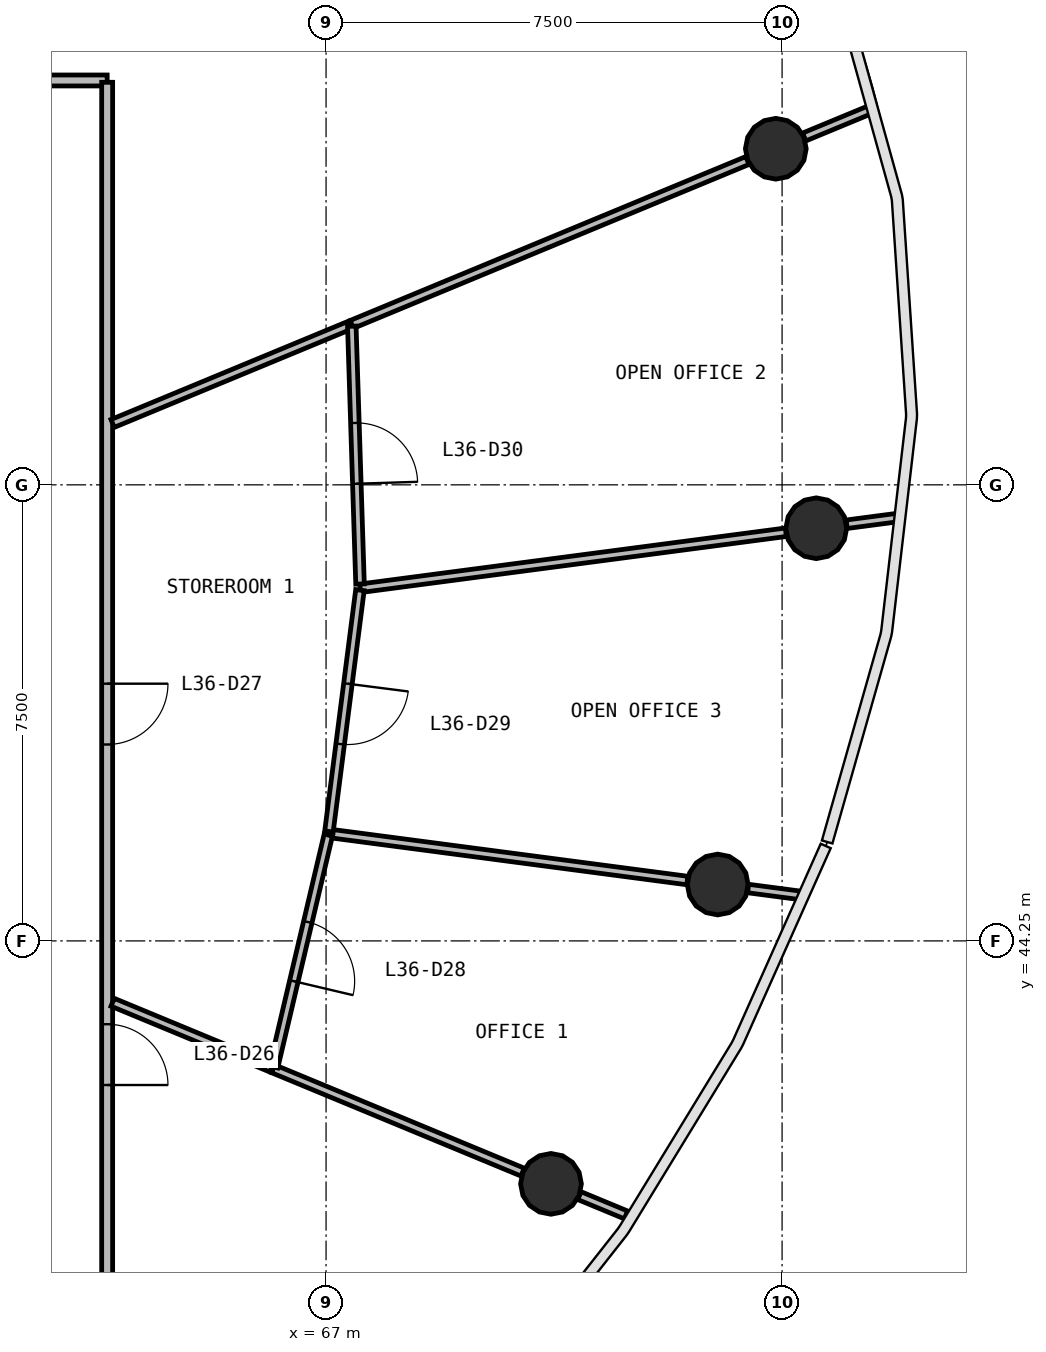
"""IFC4 building model, lengths in metres.
Left out: names, types, materials, properties, quantities, classifications, styles, units other than length and angle.
Written with IfcOpenShell. Run it as: python <this file> out.ifc"""

import sys

from ifc_helpers import new_model, si_unit, direction, frame, frame_2d, origin, origin_2d, place, context, subcontext, project, spatial, rectangle, circle, extrude, source, transform, mapped, element, fill, save


model = new_model("IFC4")
c1 = context("Model", 3, precision=1e-05, world=origin(), true_north=direction((0.0, 1.0)))
c2 = subcontext(c1, "Body", "Model", "MODEL_VIEW")
j1 = project(units=[si_unit("LENGTHUNIT", "METRE"), si_unit("PLANEANGLEUNIT", "RADIAN")], contexts=[c1])
p1 = place(None, origin())
s1 = spatial("IfcSite", under=j1, at=p1, CompositionType="ELEMENT")
p2 = place(p1, origin())
s2 = spatial("IfcBuilding", under=s1, at=p2, CompositionType="ELEMENT")
p3 = place(p2, frame((0.0, 0.0, 152.6)))
s3 = spatial("IfcBuildingStorey", under=s2, at=p3, CompositionType="ELEMENT", Elevation=152.6)
m1 = source(origin(), c2, "Body", "SweptSolid", [
    extrude(circle(Radius=0.5, at=origin_2d()), origin(), (0.0, 0.0, 1.0), 3.9),
])
for number, where, z_axis, x_axis in (
    (1, (75.062, 51.036, 0.0), (0.0, 0.0, 1.0), (1.0, 0.0, 0.0)),
    (2, (74.397, 57.277, 0.0), (0.0, 0.0, 1.0), (1.0, 0.0, 0.0)),
    (3, (70.699, 40.254, 0.0), (0.0, 0.0, 1.0), (1.0, 0.0, 0.0)),
    (4, (73.441, 45.177, 0.0), (0.0, 0.0, 1.0), (1.0, 0.0, 0.0)),
):
    element("IfcColumn", number, at=place(p3, frame(where, z_axis=z_axis, x_axis=x_axis)), inside=s3, PredefinedType="COLUMN", context=c2, shape_type="MappedRepresentation", body=[
        mapped(m1, transform((0.0, 0.0, 0.0), scale=1.0)),
    ])
p4 = place(p3, frame((40.6, 58.4, 0.0), z_axis=(0.0, 0.0, 1.0), x_axis=(1.0, 0.0, 0.0)))
e5 = element("IfcWall", 5, at=p4, inside=s3, PredefinedType="PARTITIONING", context=c2, shape_type="SweptSolid", body=[
    extrude(rectangle(XDim=22.8, YDim=0.18, at=frame_2d((11.4, 0.0))), origin(), (0.0, 0.0, 1.0), 2.88),
])
p5 = place(p4, frame((12.95, 0.0, 0.0)))
e6 = element("IfcOpeningElement", 6, at=p5, cuts=e5, PredefinedType="OPENING", context=c2, shape_type="SweptSolid", body=[
    extrude(rectangle(XDim=1.0, YDim=2.1, at=frame_2d((0.5, 1.05))), frame((0.0, 0.1, 0.0), z_axis=(0.0, -1.0, 0.0), x_axis=(1.0, 0.0, 0.0)), (0.0, 0.0, 1.0), 0.2),
])
p6 = place(p4, frame((10.95, 0.0, 0.0)))
e7 = element("IfcOpeningElement", 7, at=p6, cuts=e5, PredefinedType="OPENING", context=c2, shape_type="SweptSolid", body=[
    extrude(rectangle(XDim=1.0, YDim=2.1, at=frame_2d((0.5, 1.05))), frame((0.0, 0.1, 0.0), z_axis=(0.0, -1.0, 0.0), x_axis=(1.0, 0.0, 0.0)), (0.0, 0.0, 1.0), 0.2),
])
p7 = place(p3, frame((63.4, 58.37, 0.0), z_axis=(0.0, 0.0, 1.0), x_axis=(0.0, -1.0, 0.0)))
e8 = element("IfcWall", 8, at=p7, inside=s3, PredefinedType="PARTITIONING", context=c2, shape_type="SweptSolid", body=[
    extrude(rectangle(XDim=20.74, YDim=0.18, at=frame_2d((10.37, 0.0))), origin(), (0.0, 0.0, 1.0), 2.88),
])
p8 = place(p7, frame((15.49, 0.0, 0.0)))
e9 = element("IfcOpeningElement", 9, at=p8, cuts=e8, PredefinedType="OPENING", context=c2, shape_type="SweptSolid", body=[
    extrude(rectangle(XDim=1.0, YDim=2.1, at=frame_2d((0.5, 1.05))), frame((0.0, 0.1, 0.0), z_axis=(0.0, -1.0, 0.0), x_axis=(1.0, 0.0, 0.0)), (0.0, 0.0, 1.0), 0.2),
])
p9 = place(p7, frame((9.89, 0.0, 0.0)))
e10 = element("IfcOpeningElement", 10, at=p9, cuts=e8, PredefinedType="OPENING", context=c2, shape_type="SweptSolid", body=[
    extrude(rectangle(XDim=1.0, YDim=2.1, at=frame_2d((0.5, 1.05))), frame((0.0, 0.1, 0.0), z_axis=(0.0, -1.0, 0.0), x_axis=(1.0, 0.0, 0.0)), (0.0, 0.0, 1.0), 0.2),
])
p10 = place(p3, frame((67.561, 50.049, 0.0), z_axis=(0.0, 0.0, 1.0), x_axis=(0.991446056041, 0.130517117504, 0.0)))
e11 = element("IfcWall", 11, at=p10, inside=s3, PredefinedType="PARTITIONING", context=c2, shape_type="SweptSolid", body=[
    extrude(rectangle(XDim=7.061, YDim=0.14, at=frame_2d((3.531, 0.0))), origin(), (0.0, 0.0, 1.0), 2.88),
])
p11 = place(p3, frame((67.423, 54.388, 0.0), z_axis=(0.0, 0.0, 1.0), x_axis=(0.923877847589, 0.382687500102, 0.0)))
e12 = element("IfcWall", 12, at=p11, inside=s3, PredefinedType="PARTITIONING", context=c2, shape_type="SweptSolid", body=[
    extrude(rectangle(XDim=7.044, YDim=0.14, at=frame_2d((3.522, 0.0))), origin(), (0.0, 0.0, 1.0), 2.88),
])
p12 = place(p3, frame((67.044, 46.019, 0.0), z_axis=(0.0, 0.0, 1.0), x_axis=(0.991450523091, -0.13048318, 0.0)))
e13 = element("IfcWall", 13, at=p12, inside=s3, PredefinedType="PARTITIONING", context=c2, shape_type="SweptSolid", body=[
    extrude(rectangle(XDim=5.948, YDim=0.14, at=frame_2d((2.974, 0.0))), origin(), (0.0, 0.0, 1.0), 2.88),
])
p13 = place(p3, frame((66.131, 42.147, 0.0), z_axis=(0.0, 0.0, 1.0), x_axis=(0.923872072557, -0.382701441792, 0.0)))
e14 = element("IfcWall", 14, at=p13, inside=s3, PredefinedType="PARTITIONING", context=c2, shape_type="SweptSolid", body=[
    extrude(rectangle(XDim=4.44, YDim=0.14, at=frame_2d((2.22, 0.0))), origin(), (0.0, 0.0, 1.0), 2.88),
])
p14 = place(p3, frame((63.49, 52.759, 0.0), z_axis=(0.0, 0.0, 1.0), x_axis=(0.923878137975, 0.382686799055, 0.0)))
e15 = element("IfcWall", 15, at=p14, inside=s3, PredefinedType="PARTITIONING", context=c2, shape_type="SweptSolid", body=[
    extrude(rectangle(XDim=4.227, YDim=0.14, at=frame_2d((2.113, 0.0))), origin(), (0.0, 0.0, 1.0), 2.88),
])
p15 = place(p3, frame((67.424, 54.358, 0.0), z_axis=(0.0, 0.0, 1.0), x_axis=(0.031887030208, -0.999491479356, 0.0)))
e16 = element("IfcWall", 16, at=p15, inside=s3, PredefinedType="PARTITIONING", context=c2, shape_type="SweptSolid", body=[
    extrude(rectangle(XDim=4.242, YDim=0.14, at=frame_2d((2.121, 0.0))), origin(), (0.0, 0.0, 1.0), 2.88),
])
p16 = place(p15, frame((1.592, 0.0, 0.0)))
e17 = element("IfcOpeningElement", 17, at=p16, cuts=e16, PredefinedType="OPENING", context=c2, shape_type="SweptSolid", body=[
    extrude(rectangle(XDim=1.0, YDim=2.1, at=frame_2d((0.5, 1.05))), frame((0.0, 0.08, 0.0), z_axis=(0.0, -1.0, 0.0), x_axis=(1.0, 0.0, 0.0)), (0.0, 0.0, 1.0), 0.16),
])
p17 = place(p3, frame((67.557, 50.019, 0.0), z_axis=(0.0, 0.0, 1.0), x_axis=(-0.127375141881, -0.99185461295, 0.0)))
e18 = element("IfcWall", 18, at=p17, inside=s3, PredefinedType="PARTITIONING", context=c2, shape_type="SweptSolid", body=[
    extrude(rectangle(XDim=4.002, YDim=0.14, at=frame_2d((2.001, 0.0))), origin(), (0.0, 0.0, 1.0), 2.88),
])
p18 = place(p17, frame((1.552, 0.0, 0.0)))
e19 = element("IfcOpeningElement", 19, at=p18, cuts=e18, PredefinedType="OPENING", context=c2, shape_type="SweptSolid", body=[
    extrude(rectangle(XDim=1.0, YDim=2.1, at=frame_2d((0.5, 1.05))), frame((0.0, 0.08, 0.0), z_axis=(0.0, -1.0, 0.0), x_axis=(1.0, 0.0, 0.0)), (0.0, 0.0, 1.0), 0.16),
])
p19 = place(p3, frame((67.037, 45.99, 0.0), z_axis=(0.0, 0.0, 1.0), x_axis=(-0.229452538662, -0.973319851077, 0.0)))
e20 = element("IfcWall", 20, at=p19, inside=s3, PredefinedType="PARTITIONING", context=c2, shape_type="SweptSolid", body=[
    extrude(rectangle(XDim=3.919, YDim=0.14, at=frame_2d((1.959, 0.0))), origin(), (0.0, 0.0, 1.0), 2.88),
])
p20 = place(p19, frame((1.469, 0.0, 0.0)))
e21 = element("IfcOpeningElement", 21, at=p20, cuts=e20, PredefinedType="OPENING", context=c2, shape_type="SweptSolid", body=[
    extrude(rectangle(XDim=1.0, YDim=2.1, at=frame_2d((0.5, 1.05))), frame((0.0, 0.08, 0.0), z_axis=(0.0, -1.0, 0.0), x_axis=(1.0, 0.0, 0.0)), (0.0, 0.0, 1.0), 0.16),
])
p21 = place(p3, frame((63.49, 43.241, 0.0), z_axis=(0.0, 0.0, 1.0), x_axis=(0.923859015747, -0.382732960462, 0.0)))
e22 = element("IfcWall", 22, at=p21, inside=s3, PredefinedType="PARTITIONING", context=c2, shape_type="SweptSolid", body=[
    extrude(rectangle(XDim=2.828, YDim=0.14, at=frame_2d((1.414, 0.0))), origin(), (0.0, 0.0, 1.0), 2.88),
])
p22 = place(p3, frame((74.863, 57.47, 0.0), z_axis=(0.0, 0.0, 1.0), x_axis=(0.923882723383, 0.382675728829, 0.0)))
e23 = element("IfcWall", 23, at=p22, inside=s3, PredefinedType="PARTITIONING", context=c2, shape_type="SweptSolid", body=[
    extrude(rectangle(XDim=1.198, YDim=0.14, at=frame_2d((0.599, 0.0))), origin(), (0.0, 0.0, 1.0), 2.88),
])
p23 = place(p3, frame((73.941, 45.111, 0.0), z_axis=(0.0, 0.0, 1.0), x_axis=(0.991446500326, -0.130513742537, 0.0)))
e24 = element("IfcWall", 24, at=p23, inside=s3, PredefinedType="PARTITIONING", context=c2, shape_type="SweptSolid", body=[
    extrude(rectangle(XDim=0.853, YDim=0.14, at=frame_2d((0.427, 0.0))), origin(), (0.0, 0.0, 1.0), 2.88),
])
p24 = place(p3, frame((75.562, 51.102, 0.0), z_axis=(0.0, 0.0, 1.0), x_axis=(0.991432738393, 0.130618242377, 0.0)))
e25 = element("IfcWall", 25, at=p24, inside=s3, PredefinedType="PARTITIONING", context=c2, shape_type="SweptSolid", body=[
    extrude(rectangle(XDim=0.849, YDim=0.14, at=frame_2d((0.424, 0.0))), origin(), (0.0, 0.0, 1.0), 2.88),
])
p25 = place(p3, frame((71.166, 40.061, 0.0), z_axis=(0.0, 0.0, 1.0), x_axis=(0.923909393783, -0.382611332921, 0.0)))
e26 = element("IfcWall", 26, at=p25, inside=s3, PredefinedType="PARTITIONING", context=c2, shape_type="SweptSolid", body=[
    extrude(rectangle(XDim=0.831, YDim=0.14, at=frame_2d((0.416, 0.0))), origin(), (0.0, 0.0, 1.0), 2.88),
])
m2 = source(origin(), c2, "Body", "SweptSolid", [
    extrude(rectangle(XDim=1.0, YDim=2.1, at=frame_2d((0.5, 1.05))), frame((0.0, 0.025, 0.0), z_axis=(0.0, -1.0, 0.0), x_axis=(1.0, 0.0, 0.0)), (0.0, 0.0, 1.0), 0.05),
])
p26 = place(p8, origin())
e27 = element("IfcDoor", 27, at=p26, inside=s3, OperationType="SINGLE_SWING_RIGHT", PredefinedType="DOOR", context=c2, shape_type="MappedRepresentation", body=[
    mapped(m2, transform((0.0, 0.0, 0.0), scale=1.0)),
])
fill(e9, e27)
p27 = place(p9, origin())
e28 = element("IfcDoor", 28, at=p27, inside=s3, OperationType="SINGLE_SWING_LEFT", PredefinedType="DOOR", context=c2, shape_type="MappedRepresentation", body=[
    mapped(m2, transform((0.0, 0.0, 0.0), scale=1.0)),
])
fill(e10, e28)
p28 = place(p20, origin())
e29 = element("IfcDoor", 29, at=p28, inside=s3, OperationType="SINGLE_SWING_RIGHT", PredefinedType="DOOR", context=c2, shape_type="MappedRepresentation", body=[
    mapped(m2, transform((0.0, 0.0, 0.0), scale=1.0)),
])
fill(e21, e29)
p29 = place(p18, origin())
e30 = element("IfcDoor", 30, at=p29, inside=s3, OperationType="SINGLE_SWING_LEFT", PredefinedType="DOOR", context=c2, shape_type="MappedRepresentation", body=[
    mapped(m2, transform((0.0, 0.0, 0.0), scale=1.0)),
])
fill(e19, e30)
p30 = place(p16, origin())
e31 = element("IfcDoor", 31, at=p30, inside=s3, OperationType="SINGLE_SWING_RIGHT", PredefinedType="DOOR", context=c2, shape_type="MappedRepresentation", body=[
    mapped(m2, transform((0.0, 0.0, 0.0), scale=1.0)),
])
fill(e17, e31)
save(model, sys.argv[1])
